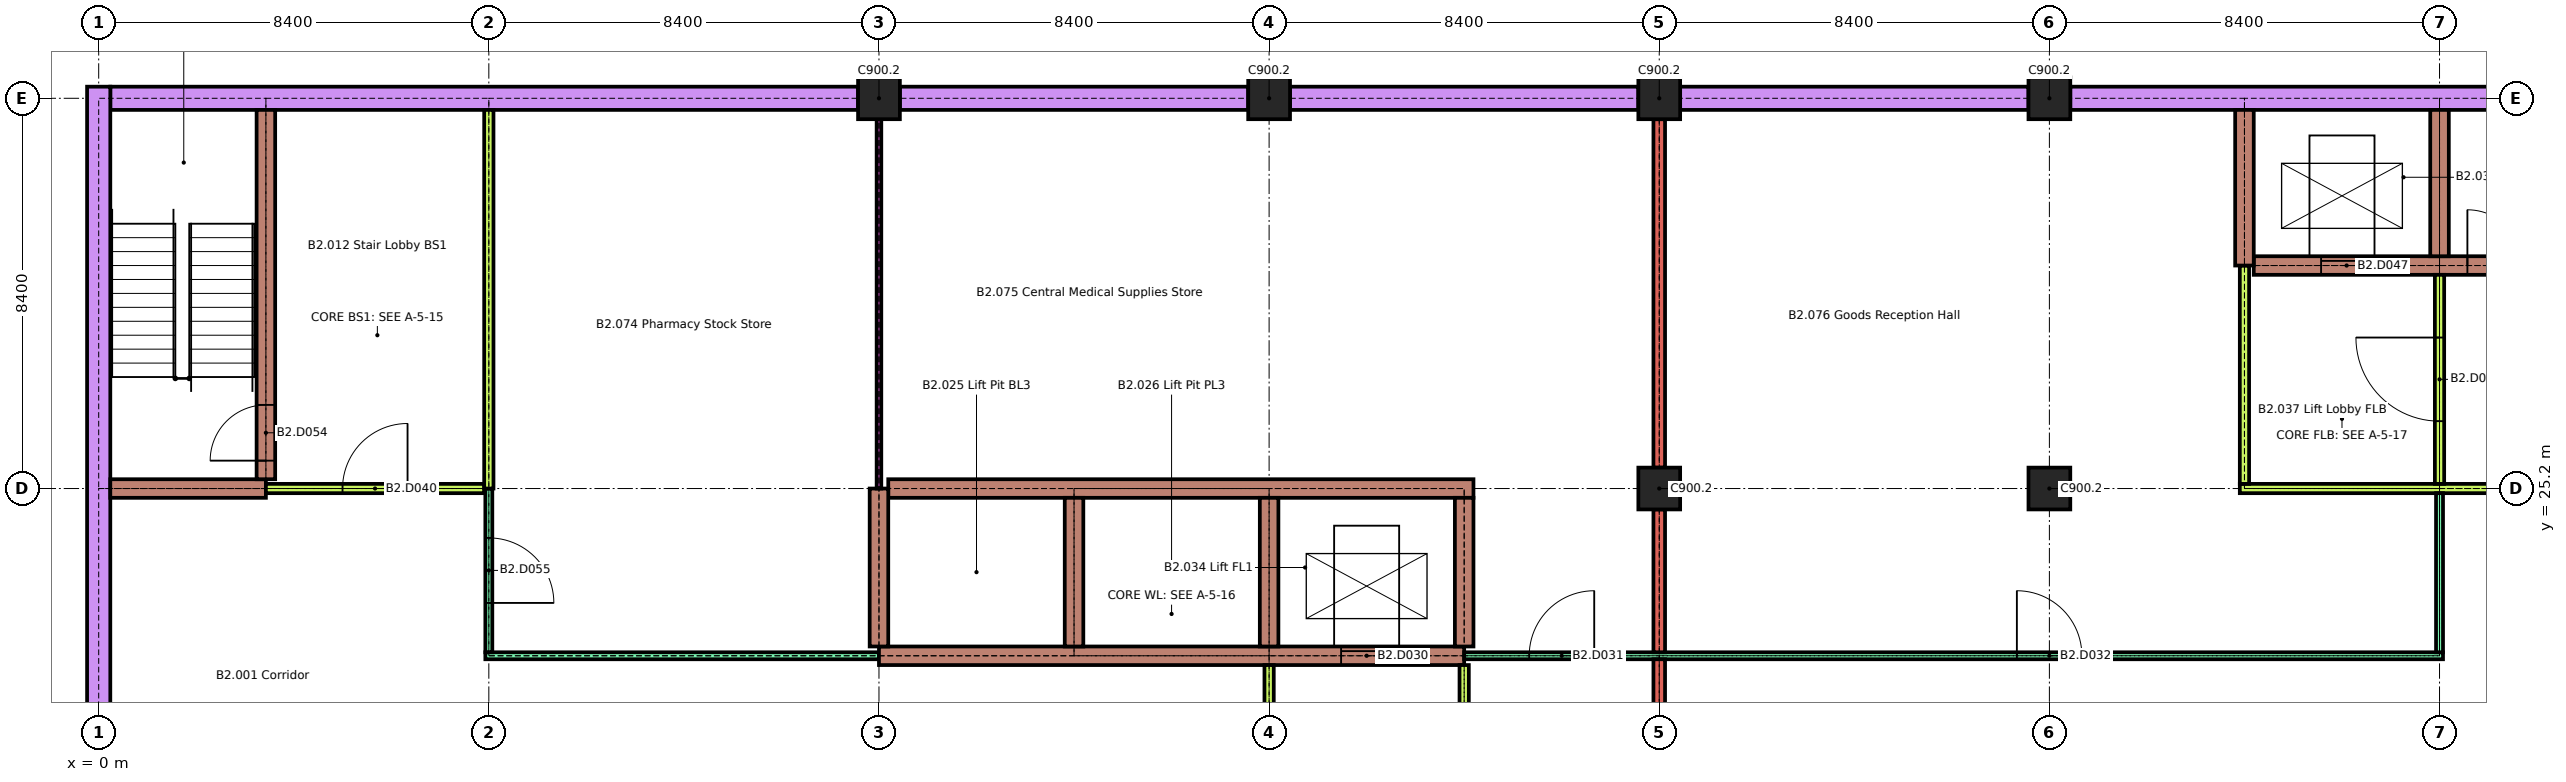
"""IFC4 building model, lengths in metres.
Left out: names, types, materials, properties, quantities, classifications, styles, units other than length and angle.
Written with IfcOpenShell. Run it as: python <this file> out.ifc"""

import sys

from ifc_helpers import new_model, si_unit, direction, frame, frame_2d, origin, origin_2d, place, context, subcontext, project, spatial, rectangle, extrude, element, fill, save


model = new_model("IFC4")
c1 = context("Model", 3, precision=1e-05, world=origin(), true_north=direction((0.0, 1.0)))
c2 = subcontext(c1, "Body", "Model", "MODEL_VIEW")
j1 = project(units=[si_unit("LENGTHUNIT", "METRE"), si_unit("PLANEANGLEUNIT", "RADIAN")], contexts=[c1])
p1 = place(None, origin())
s1 = spatial("IfcSite", under=j1, at=p1, CompositionType="ELEMENT")
p2 = place(p1, origin())
s2 = spatial("IfcBuilding", under=s1, at=p2, CompositionType="ELEMENT")
p3 = place(p2, frame((0.0, 0.0, -7.8)))
s3 = spatial("IfcBuildingStorey", under=s2, at=p3, CompositionType="ELEMENT", Elevation=-7.8)
for number, where, z_axis, x_axis in (
    (1, (33.6, 25.2, 0.0), (0.0, 0.0, 1.0), (1.0, 0.0, 0.0)),
    (2, (42.0, 25.2, 0.0), (0.0, 0.0, 1.0), (1.0, 0.0, 0.0)),
    (3, (16.8, 33.6, 0.0), (0.0, 0.0, 1.0), (1.0, 0.0, 0.0)),
    (4, (25.2, 33.6, 0.0), (0.0, 0.0, 1.0), (1.0, 0.0, 0.0)),
    (5, (33.6, 33.6, 0.0), (0.0, 0.0, 1.0), (1.0, 0.0, 0.0)),
    (6, (42.0, 33.6, 0.0), (0.0, 0.0, 1.0), (1.0, 0.0, 0.0)),
):
    element("IfcColumn", number, at=place(p3, frame(where, z_axis=z_axis, x_axis=x_axis)), inside=s3, PredefinedType="COLUMN", context=c2, shape_type="SweptSolid", body=[
        extrude(rectangle(XDim=0.9, YDim=0.9, at=origin_2d()), origin(), (0.0, 0.0, 1.0), 3.1),
    ])
p4 = place(p3, frame((0.25, 33.6, 0.0), z_axis=(0.0, 0.0, 1.0), x_axis=(1.0, 0.0, 0.0)))
e7 = element("IfcWall", 7, at=p4, inside=s3, PredefinedType="SOLIDWALL", context=c2, shape_type="SweptSolid", body=[
    extrude(rectangle(XDim=16.1, YDim=0.5, at=frame_2d((8.05, 0.0))), origin(), (0.0, 0.0, 1.0), 3.1),
])
for number, where, z_axis, x_axis in (
    (8, (17.25, 33.6, 0.0), (0.0, 0.0, 1.0), (1.0, 0.0, 0.0)),
    (9, (25.65, 33.6, 0.0), (0.0, 0.0, 1.0), (1.0, 0.0, 0.0)),
    (10, (34.05, 33.6, 0.0), (0.0, 0.0, 1.0), (1.0, 0.0, 0.0)),
):
    element("IfcWall", number, at=place(p3, frame(where, z_axis=z_axis, x_axis=x_axis)), inside=s3, PredefinedType="SOLIDWALL", context=c2, shape_type="SweptSolid", body=[
        extrude(rectangle(XDim=7.5, YDim=0.5, at=frame_2d((3.75, 0.0))), origin(), (0.0, 0.0, 1.0), 3.1),
    ])
p5 = place(p3, frame((42.45, 33.6, 0.0), z_axis=(0.0, 0.0, 1.0), x_axis=(1.0, 0.0, 0.0)))
e11 = element("IfcWall", 11, at=p5, inside=s3, PredefinedType="SOLIDWALL", context=c2, shape_type="SweptSolid", body=[
    extrude(rectangle(XDim=41.1, YDim=0.5, at=frame_2d((20.55, 0.0))), origin(), (0.0, 0.0, 1.0), 3.1),
])
p6 = place(p3, frame((0.0, 17.25, 0.0), z_axis=(0.0, 0.0, 1.0), x_axis=(0.0, 1.0, 0.0)))
e12 = element("IfcWall", 12, at=p6, inside=s3, PredefinedType="SOLIDWALL", context=c2, shape_type="SweptSolid", body=[
    extrude(rectangle(XDim=16.6, YDim=0.5, at=frame_2d((8.3, 0.0))), origin(), (0.0, 0.0, 1.0), 3.1),
])
p7 = place(p3, frame((8.325, 21.6, 0.0), z_axis=(0.0, 0.0, 1.0), x_axis=(1.0, 0.0, 0.0)))
e13 = element("IfcWall", 13, at=p7, inside=s3, PredefinedType="PARTITIONING", context=c2, shape_type="SweptSolid", body=[
    extrude(rectangle(XDim=8.475, YDim=0.15, at=frame_2d((4.238, 0.0))), origin(), (0.0, 0.0, 1.0), 3.1),
])
p8 = place(p3, frame((16.8, 21.6, 0.0), z_axis=(0.0, 0.0, 1.0), x_axis=(1.0, 0.0, 0.0)))
e14 = element("IfcWall", 14, at=p8, inside=s3, PredefinedType="SHEAR", context=c2, shape_type="SweptSolid", body=[
    extrude(rectangle(XDim=12.6, YDim=0.4, at=frame_2d((6.3, 0.0))), origin(), (0.0, 0.0, 1.0), 3.1),
])
p9 = place(p8, frame((9.95, 0.0, 0.0)))
e15 = element("IfcOpeningElement", 15, at=p9, cuts=e14, PredefinedType="OPENING", context=c2, shape_type="SweptSolid", body=[
    extrude(rectangle(XDim=1.1, YDim=2.1, at=frame_2d((0.55, 1.05))), frame((0.0, 0.21, 0.0), z_axis=(0.0, -1.0, 0.0), x_axis=(1.0, 0.0, 0.0)), (0.0, 0.0, 1.0), 0.42),
])
p10 = place(p3, frame((29.4, 21.6, 0.0), z_axis=(0.0, 0.0, 1.0), x_axis=(1.0, 0.0, 0.0)))
e16 = element("IfcWall", 16, at=p10, inside=s3, PredefinedType="PARTITIONING", context=c2, shape_type="SweptSolid", body=[
    extrude(rectangle(XDim=21.075, YDim=0.15, at=frame_2d((10.538, 0.0))), origin(), (0.0, 0.0, 1.0), 3.1),
])
p11 = place(p10, frame((1.4, 0.0, 0.0)))
e17 = element("IfcOpeningElement", 17, at=p11, cuts=e16, PredefinedType="OPENING", context=c2, shape_type="SweptSolid", body=[
    extrude(rectangle(XDim=1.4, YDim=2.1, at=frame_2d((0.7, 1.05))), frame((0.0, 0.085, 0.0), z_axis=(0.0, -1.0, 0.0), x_axis=(1.0, 0.0, 0.0)), (0.0, 0.0, 1.0), 0.17),
])
p12 = place(p10, frame((11.9, 0.0, 0.0)))
e18 = element("IfcOpeningElement", 18, at=p12, cuts=e16, PredefinedType="OPENING", context=c2, shape_type="SweptSolid", body=[
    extrude(rectangle(XDim=1.4, YDim=2.1, at=frame_2d((0.7, 1.05))), frame((0.0, 0.085, 0.0), z_axis=(0.0, -1.0, 0.0), x_axis=(1.0, 0.0, 0.0)), (0.0, 0.0, 1.0), 0.17),
])
p13 = place(p3, frame((0.25, 25.2, 0.0), z_axis=(0.0, 0.0, 1.0), x_axis=(1.0, 0.0, 0.0)))
e19 = element("IfcWall", 19, at=p13, inside=s3, PredefinedType="SHEAR", context=c2, shape_type="SweptSolid", body=[
    extrude(rectangle(XDim=3.35, YDim=0.4, at=frame_2d((1.675, 0.0))), origin(), (0.0, 0.0, 1.0), 3.1),
])
p14 = place(p3, frame((3.6, 25.2, 0.0), z_axis=(0.0, 0.0, 1.0), x_axis=(1.0, 0.0, 0.0)))
e20 = element("IfcWall", 20, at=p14, inside=s3, PredefinedType="PARTITIONING", context=c2, shape_type="SweptSolid", body=[
    extrude(rectangle(XDim=4.7, YDim=0.2, at=frame_2d((2.35, 0.0))), origin(), (0.0, 0.0, 1.0), 3.1),
])
p15 = place(p14, frame((1.65, 0.0, 0.0)))
e21 = element("IfcOpeningElement", 21, at=p15, cuts=e20, PredefinedType="OPENING", context=c2, shape_type="SweptSolid", body=[
    extrude(rectangle(XDim=1.4, YDim=2.1, at=frame_2d((0.7, 1.05))), frame((0.0, 0.11, 0.0), z_axis=(0.0, -1.0, 0.0), x_axis=(1.0, 0.0, 0.0)), (0.0, 0.0, 1.0), 0.22),
])
p16 = place(p3, frame((17.0, 25.2, 0.0), z_axis=(0.0, 0.0, 1.0), x_axis=(1.0, 0.0, 0.0)))
e22 = element("IfcWall", 22, at=p16, inside=s3, PredefinedType="SHEAR", context=c2, shape_type="SweptSolid", body=[
    extrude(rectangle(XDim=12.6, YDim=0.4, at=frame_2d((6.3, 0.0))), origin(), (0.0, 0.0, 1.0), 3.1),
])
p17 = place(p3, frame((46.1, 25.2, 0.0), z_axis=(0.0, 0.0, 1.0), x_axis=(1.0, 0.0, 0.0)))
e23 = element("IfcWall", 23, at=p17, inside=s3, PredefinedType="PARTITIONING", context=c2, shape_type="SweptSolid", body=[
    extrude(rectangle(XDim=12.6, YDim=0.2, at=frame_2d((6.3, 0.0))), origin(), (0.0, 0.0, 1.0), 3.1),
])
p18 = place(p17, frame((7.75, 0.0, 0.0)))
e24 = element("IfcOpeningElement", 24, at=p18, cuts=e23, PredefinedType="OPENING", context=c2, shape_type="SweptSolid", body=[
    extrude(rectangle(XDim=1.4, YDim=2.1, at=frame_2d((0.7, 1.05))), frame((0.0, 0.11, 0.0), z_axis=(0.0, -1.0, 0.0), x_axis=(1.0, 0.0, 0.0)), (0.0, 0.0, 1.0), 0.22),
])
p19 = place(p3, frame((46.4, 30.0, 0.0), z_axis=(0.0, 0.0, 1.0), x_axis=(1.0, 0.0, 0.0)))
e25 = element("IfcWall", 25, at=p19, inside=s3, PredefinedType="SHEAR", context=c2, shape_type="SweptSolid", body=[
    extrude(rectangle(XDim=12.2, YDim=0.4, at=frame_2d((6.1, 0.0))), origin(), (0.0, 0.0, 1.0), 3.1),
])
p20 = place(p19, frame((1.45, 0.0, 0.0)))
e26 = element("IfcOpeningElement", 26, at=p20, cuts=e25, PredefinedType="OPENING", context=c2, shape_type="SweptSolid", body=[
    extrude(rectangle(XDim=1.1, YDim=2.1, at=frame_2d((0.55, 1.05))), frame((0.0, 0.21, 0.0), z_axis=(0.0, -1.0, 0.0), x_axis=(1.0, 0.0, 0.0)), (0.0, 0.0, 1.0), 0.42),
])
p21 = place(p19, frame((4.6, 0.0, 0.0)))
e27 = element("IfcOpeningElement", 27, at=p21, cuts=e25, PredefinedType="OPENING", context=c2, shape_type="SweptSolid", body=[
    extrude(rectangle(XDim=1.2, YDim=2.1, at=frame_2d((0.6, 1.05))), frame((0.0, 0.21, 0.0), z_axis=(0.0, -1.0, 0.0), x_axis=(1.0, 0.0, 0.0)), (0.0, 0.0, 1.0), 0.42),
])
p22 = place(p3, frame((3.6, 25.4, 0.0), z_axis=(0.0, 0.0, 1.0), x_axis=(0.0, 1.0, 0.0)))
e28 = element("IfcWall", 28, at=p22, inside=s3, PredefinedType="SHEAR", context=c2, shape_type="SweptSolid", body=[
    extrude(rectangle(XDim=7.95, YDim=0.4, at=frame_2d((3.975, 0.0))), origin(), (0.0, 0.0, 1.0), 3.1),
])
p23 = place(p22, frame((0.4, 0.0, 0.0)))
e29 = element("IfcOpeningElement", 29, at=p23, cuts=e28, PredefinedType="OPENING", context=c2, shape_type="SweptSolid", body=[
    extrude(rectangle(XDim=1.2, YDim=2.1, at=frame_2d((0.6, 1.05))), frame((0.0, 0.21, 0.0), z_axis=(0.0, -1.0, 0.0), x_axis=(1.0, 0.0, 0.0)), (0.0, 0.0, 1.0), 0.42),
])
p24 = place(p3, frame((8.4, 21.675, 0.0), z_axis=(0.0, 0.0, 1.0), x_axis=(0.0, 1.0, 0.0)))
e30 = element("IfcWall", 30, at=p24, inside=s3, PredefinedType="PARTITIONING", context=c2, shape_type="SweptSolid", body=[
    extrude(rectangle(XDim=3.525, YDim=0.15, at=frame_2d((1.762, 0.0))), origin(), (0.0, 0.0, 1.0), 3.1),
])
p25 = place(p24, frame((1.062, 0.0, 0.0)))
e31 = element("IfcOpeningElement", 31, at=p25, cuts=e30, PredefinedType="OPENING", context=c2, shape_type="SweptSolid", body=[
    extrude(rectangle(XDim=1.4, YDim=2.1, at=frame_2d((0.7, 1.05))), frame((0.0, 0.085, 0.0), z_axis=(0.0, -1.0, 0.0), x_axis=(1.0, 0.0, 0.0)), (0.0, 0.0, 1.0), 0.17),
])
p26 = place(p3, frame((8.4, 25.2, 0.0), z_axis=(0.0, 0.0, 1.0), x_axis=(0.0, 1.0, 0.0)))
e32 = element("IfcWall", 32, at=p26, inside=s3, PredefinedType="PARTITIONING", context=c2, shape_type="SweptSolid", body=[
    extrude(rectangle(XDim=8.15, YDim=0.2, at=frame_2d((4.075, 0.0))), origin(), (0.0, 0.0, 1.0), 3.1),
])
p27 = place(p3, frame((16.8, 21.8, 0.0), z_axis=(0.0, 0.0, 1.0), x_axis=(0.0, 1.0, 0.0)))
e33 = element("IfcWall", 33, at=p27, inside=s3, PredefinedType="SHEAR", context=c2, shape_type="SweptSolid", body=[
    extrude(rectangle(XDim=3.4, YDim=0.4, at=frame_2d((1.7, 0.0))), origin(), (0.0, 0.0, 1.0), 3.1),
])
p28 = place(p3, frame((16.8, 25.2, 0.0), z_axis=(0.0, 0.0, 1.0), x_axis=(0.0, 1.0, 0.0)))
e34 = element("IfcWall", 34, at=p28, inside=s3, PredefinedType="PARTITIONING", context=c2, shape_type="SweptSolid", body=[
    extrude(rectangle(XDim=7.95, YDim=0.1, at=frame_2d((3.975, 0.0))), origin(), (0.0, 0.0, 1.0), 3.1),
])
p29 = place(p3, frame((21.0, 21.8, 0.0), z_axis=(0.0, 0.0, 1.0), x_axis=(0.0, 1.0, 0.0)))
e35 = element("IfcWall", 35, at=p29, inside=s3, PredefinedType="SHEAR", context=c2, shape_type="SweptSolid", body=[
    extrude(rectangle(XDim=3.2, YDim=0.4, at=frame_2d((1.6, 0.0))), origin(), (0.0, 0.0, 1.0), 3.1),
])
p30 = place(p3, frame((25.2, 16.9, 0.0), z_axis=(0.0, 0.0, 1.0), x_axis=(0.0, 1.0, 0.0)))
e36 = element("IfcWall", 36, at=p30, inside=s3, PredefinedType="PARTITIONING", context=c2, shape_type="SweptSolid", body=[
    extrude(rectangle(XDim=4.5, YDim=0.2, at=frame_2d((2.25, 0.0))), origin(), (0.0, 0.0, 1.0), 3.1),
])
p31 = place(p30, frame((1.25, 0.0, 0.0)))
e37 = element("IfcOpeningElement", 37, at=p31, cuts=e36, PredefinedType="OPENING", context=c2, shape_type="SweptSolid", body=[
    extrude(rectangle(XDim=2.0, YDim=2.4, at=frame_2d((1.0, 1.2))), frame((0.0, 0.11, 0.0), z_axis=(0.0, -1.0, 0.0), x_axis=(1.0, 0.0, 0.0)), (0.0, 0.0, 1.0), 0.22),
])
p32 = place(p3, frame((25.2, 21.8, 0.0), z_axis=(0.0, 0.0, 1.0), x_axis=(0.0, 1.0, 0.0)))
e38 = element("IfcWall", 38, at=p32, inside=s3, PredefinedType="SHEAR", context=c2, shape_type="SweptSolid", body=[
    extrude(rectangle(XDim=3.2, YDim=0.4, at=frame_2d((1.6, 0.0))), origin(), (0.0, 0.0, 1.0), 3.1),
])
p33 = place(p3, frame((29.4, 16.9, 0.0), z_axis=(0.0, 0.0, 1.0), x_axis=(0.0, 1.0, 0.0)))
e39 = element("IfcWall", 39, at=p33, inside=s3, PredefinedType="PARTITIONING", context=c2, shape_type="SweptSolid", body=[
    extrude(rectangle(XDim=4.5, YDim=0.2, at=frame_2d((2.25, 0.0))), origin(), (0.0, 0.0, 1.0), 3.1),
])
p34 = place(p33, frame((1.25, 0.0, 0.0)))
e40 = element("IfcOpeningElement", 40, at=p34, cuts=e39, PredefinedType="OPENING", context=c2, shape_type="SweptSolid", body=[
    extrude(rectangle(XDim=2.0, YDim=2.4, at=frame_2d((1.0, 1.2))), frame((0.0, 0.11, 0.0), z_axis=(0.0, -1.0, 0.0), x_axis=(1.0, 0.0, 0.0)), (0.0, 0.0, 1.0), 0.22),
])
p35 = place(p3, frame((29.4, 21.8, 0.0), z_axis=(0.0, 0.0, 1.0), x_axis=(0.0, 1.0, 0.0)))
e41 = element("IfcWall", 41, at=p35, inside=s3, PredefinedType="SHEAR", context=c2, shape_type="SweptSolid", body=[
    extrude(rectangle(XDim=3.2, YDim=0.4, at=frame_2d((1.6, 0.0))), origin(), (0.0, 0.0, 1.0), 3.1),
])
p36 = place(p3, frame((33.6, 17.25, 0.0), z_axis=(0.0, 0.0, 1.0), x_axis=(0.0, 1.0, 0.0)))
e42 = element("IfcWall", 42, at=p36, inside=s3, PredefinedType="SOLIDWALL", context=c2, shape_type="SweptSolid", body=[
    extrude(rectangle(XDim=4.275, YDim=0.25, at=frame_2d((2.137, 0.0))), origin(), (0.0, 0.0, 1.0), 3.1),
])
p37 = place(p36, frame((1.137, 0.0, 0.0)))
e43 = element("IfcOpeningElement", 43, at=p37, cuts=e42, PredefinedType="OPENING", context=c2, shape_type="SweptSolid", body=[
    extrude(rectangle(XDim=2.0, YDim=2.4, at=frame_2d((1.0, 1.2))), frame((0.0, 0.135, 0.0), z_axis=(0.0, -1.0, 0.0), x_axis=(1.0, 0.0, 0.0)), (0.0, 0.0, 1.0), 0.27),
])
p38 = place(p3, frame((33.6, 21.675, 0.0), z_axis=(0.0, 0.0, 1.0), x_axis=(0.0, 1.0, 0.0)))
e44 = element("IfcWall", 44, at=p38, inside=s3, PredefinedType="SOLIDWALL", context=c2, shape_type="SweptSolid", body=[
    extrude(rectangle(XDim=3.075, YDim=0.25, at=frame_2d((1.538, 0.0))), origin(), (0.0, 0.0, 1.0), 3.1),
])
p39 = place(p3, frame((33.6, 25.65, 0.0), z_axis=(0.0, 0.0, 1.0), x_axis=(0.0, 1.0, 0.0)))
e45 = element("IfcWall", 45, at=p39, inside=s3, PredefinedType="SOLIDWALL", context=c2, shape_type="SweptSolid", body=[
    extrude(rectangle(XDim=7.5, YDim=0.25, at=frame_2d((3.75, 0.0))), origin(), (0.0, 0.0, 1.0), 3.1),
])
p40 = place(p3, frame((46.2, 25.3, 0.0), z_axis=(0.0, 0.0, 1.0), x_axis=(0.0, 1.0, 0.0)))
e46 = element("IfcWall", 46, at=p40, inside=s3, PredefinedType="PARTITIONING", context=c2, shape_type="SweptSolid", body=[
    extrude(rectangle(XDim=4.7, YDim=0.2, at=frame_2d((2.35, 0.0))), origin(), (0.0, 0.0, 1.0), 3.1),
])
p41 = place(p3, frame((46.2, 30.0, 0.0), z_axis=(0.0, 0.0, 1.0), x_axis=(0.0, 1.0, 0.0)))
e47 = element("IfcWall", 47, at=p41, inside=s3, PredefinedType="SHEAR", context=c2, shape_type="SweptSolid", body=[
    extrude(rectangle(XDim=3.35, YDim=0.4, at=frame_2d((1.675, 0.0))), origin(), (0.0, 0.0, 1.0), 3.1),
])
p42 = place(p3, frame((50.4, 21.675, 0.0), z_axis=(0.0, 0.0, 1.0), x_axis=(0.0, 1.0, 0.0)))
e48 = element("IfcWall", 48, at=p42, inside=s3, PredefinedType="PARTITIONING", context=c2, shape_type="SweptSolid", body=[
    extrude(rectangle(XDim=3.425, YDim=0.15, at=frame_2d((1.712, 0.0))), origin(), (0.0, 0.0, 1.0), 3.1),
])
p43 = place(p3, frame((50.4, 25.3, 0.0), z_axis=(0.0, 0.0, 1.0), x_axis=(0.0, 1.0, 0.0)))
e49 = element("IfcWall", 49, at=p43, inside=s3, PredefinedType="PARTITIONING", context=c2, shape_type="SweptSolid", body=[
    extrude(rectangle(XDim=4.5, YDim=0.2, at=frame_2d((2.25, 0.0))), origin(), (0.0, 0.0, 1.0), 3.1),
])
p44 = place(p43, frame((1.35, 0.0, 0.0)))
e50 = element("IfcOpeningElement", 50, at=p44, cuts=e49, PredefinedType="OPENING", context=c2, shape_type="SweptSolid", body=[
    extrude(rectangle(XDim=1.8, YDim=2.4, at=frame_2d((0.9, 1.2))), frame((0.0, 0.11, 0.0), z_axis=(0.0, -1.0, 0.0), x_axis=(1.0, 0.0, 0.0)), (0.0, 0.0, 1.0), 0.22),
])
p45 = place(p3, frame((50.4, 30.2, 0.0), z_axis=(0.0, 0.0, 1.0), x_axis=(0.0, 1.0, 0.0)))
e51 = element("IfcWall", 51, at=p45, inside=s3, PredefinedType="SHEAR", context=c2, shape_type="SweptSolid", body=[
    extrude(rectangle(XDim=3.15, YDim=0.4, at=frame_2d((1.575, 0.0))), origin(), (0.0, 0.0, 1.0), 3.1),
])
p46 = place(p9, origin())
e52 = element("IfcDoor", 52, at=p46, inside=s3, OperationType="SLIDING_TO_LEFT", PredefinedType="DOOR", context=c2, shape_type="SweptSolid", body=[
    extrude(rectangle(XDim=1.1, YDim=2.1, at=frame_2d((0.55, 1.05))), frame((0.0, 0.025, 0.0), z_axis=(0.0, -1.0, 0.0), x_axis=(1.0, 0.0, 0.0)), (0.0, 0.0, 1.0), 0.05),
])
fill(e15, e52)
p47 = place(p11, origin())
e53 = element("IfcDoor", 53, at=p47, inside=s3, OperationType="SINGLE_SWING_LEFT", PredefinedType="DOOR", context=c2, shape_type="SweptSolid", body=[
    extrude(rectangle(XDim=1.4, YDim=2.1, at=frame_2d((0.7, 1.05))), frame((0.0, 0.025, 0.0), z_axis=(0.0, -1.0, 0.0), x_axis=(1.0, 0.0, 0.0)), (0.0, 0.0, 1.0), 0.05),
])
fill(e17, e53)
p48 = place(p12, origin())
e54 = element("IfcDoor", 54, at=p48, inside=s3, OperationType="SINGLE_SWING_RIGHT", PredefinedType="DOOR", context=c2, shape_type="SweptSolid", body=[
    extrude(rectangle(XDim=1.4, YDim=2.1, at=frame_2d((0.7, 1.05))), frame((0.0, 0.025, 0.0), z_axis=(0.0, -1.0, 0.0), x_axis=(1.0, 0.0, 0.0)), (0.0, 0.0, 1.0), 0.05),
])
fill(e18, e54)
p49 = place(p15, origin())
e55 = element("IfcDoor", 55, at=p49, inside=s3, OperationType="SINGLE_SWING_LEFT", PredefinedType="DOOR", context=c2, shape_type="SweptSolid", body=[
    extrude(rectangle(XDim=1.4, YDim=2.1, at=frame_2d((0.7, 1.05))), frame((0.0, 0.03, 0.0), z_axis=(0.0, -1.0, 0.0), x_axis=(1.0, 0.0, 0.0)), (0.0, 0.0, 1.0), 0.06),
])
fill(e21, e55)
p50 = place(p20, origin())
e56 = element("IfcDoor", 56, at=p50, inside=s3, OperationType="SLIDING_TO_LEFT", PredefinedType="DOOR", context=c2, shape_type="SweptSolid", body=[
    extrude(rectangle(XDim=1.1, YDim=2.1, at=frame_2d((0.55, 1.05))), frame((0.0, 0.025, 0.0), z_axis=(0.0, -1.0, 0.0), x_axis=(1.0, 0.0, 0.0)), (0.0, 0.0, 1.0), 0.05),
])
fill(e26, e56)
p51 = place(p21, origin())
e57 = element("IfcDoor", 57, at=p51, inside=s3, OperationType="SINGLE_SWING_RIGHT", PredefinedType="DOOR", context=c2, shape_type="SweptSolid", body=[
    extrude(rectangle(XDim=1.2, YDim=2.1, at=frame_2d((0.6, 1.05))), frame((0.0, 0.025, 0.0), z_axis=(0.0, -1.0, 0.0), x_axis=(1.0, 0.0, 0.0)), (0.0, 0.0, 1.0), 0.05),
])
fill(e27, e57)
p52 = place(p23, origin())
e58 = element("IfcDoor", 58, at=p52, inside=s3, OperationType="SINGLE_SWING_RIGHT", PredefinedType="DOOR", context=c2, shape_type="SweptSolid", body=[
    extrude(rectangle(XDim=1.2, YDim=2.1, at=frame_2d((0.6, 1.05))), frame((0.0, 0.025, 0.0), z_axis=(0.0, -1.0, 0.0), x_axis=(1.0, 0.0, 0.0)), (0.0, 0.0, 1.0), 0.05),
])
fill(e29, e58)
p53 = place(p25, origin())
e59 = element("IfcDoor", 59, at=p53, inside=s3, OperationType="SINGLE_SWING_LEFT", PredefinedType="DOOR", context=c2, shape_type="SweptSolid", body=[
    extrude(rectangle(XDim=1.4, YDim=2.1, at=frame_2d((0.7, 1.05))), frame((0.0, 0.025, 0.0), z_axis=(0.0, -1.0, 0.0), x_axis=(1.0, 0.0, 0.0)), (0.0, 0.0, 1.0), 0.05),
])
fill(e31, e59)
p54 = place(p44, origin())
e60 = element("IfcDoor", 60, at=p54, inside=s3, OperationType="SINGLE_SWING_LEFT", PredefinedType="DOOR", context=c2, shape_type="SweptSolid", body=[
    extrude(rectangle(XDim=1.8, YDim=2.4, at=frame_2d((0.9, 1.2))), frame((0.0, 0.025, 0.0), z_axis=(0.0, -1.0, 0.0), x_axis=(1.0, 0.0, 0.0)), (0.0, 0.0, 1.0), 0.05),
])
fill(e50, e60)
save(model, sys.argv[1])
